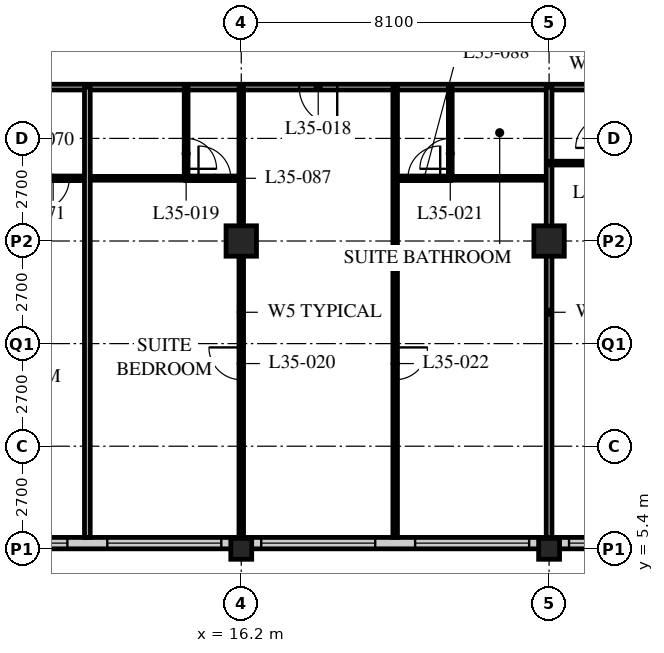
"""IFC4 building model, lengths in metres.
Left out: names, types, materials, properties, quantities, classifications, styles, units other than length and angle.
Written with IfcOpenShell. Run it as: python <this file> out.ifc"""

import sys

from ifc_helpers import new_model, si_unit, direction, frame, frame_2d, origin, origin_2d, place, context, subcontext, project, spatial, rectangle, hollow_rectangle, extrude, element, fill, save


model = new_model("IFC4")
c1 = context("Model", 3, precision=1e-05, world=origin(), true_north=direction((0.0, 1.0)))
c2 = subcontext(c1, "Body", "Model", "MODEL_VIEW")
j1 = project(units=[si_unit("LENGTHUNIT", "METRE"), si_unit("PLANEANGLEUNIT", "RADIAN")], contexts=[c1])
p1 = place(None, origin())
s1 = spatial("IfcSite", under=j1, at=p1, CompositionType="ELEMENT")
p2 = place(p1, origin())
s2 = spatial("IfcBuilding", under=s1, at=p2, CompositionType="ELEMENT")
p3 = place(p2, frame((0.0, 0.0, 137.4)))
s3 = spatial("IfcBuildingStorey", under=s2, at=p3, CompositionType="ELEMENT", Elevation=137.4)
p4 = place(p3, frame((16.2, 5.4, 0.0), z_axis=(0.0, 0.0, 1.0), x_axis=(1.0, 0.0, 0.0)))
e1 = element("IfcColumn", 1, at=p4, inside=s3, PredefinedType="COLUMN", context=c2, shape_type="SweptSolid", body=[
    extrude(hollow_rectangle(XDim=0.55, YDim=0.55, WallThickness=0.04, at=origin_2d()), origin(), (0.0, 0.0, 1.0), 3.4),
])
p5 = place(p3, frame((16.2, 13.5, 0.0), z_axis=(0.0, 0.0, 1.0), x_axis=(1.0, 0.0, 0.0)))
e2 = element("IfcColumn", 2, at=p5, inside=s3, PredefinedType="COLUMN", context=c2, shape_type="SweptSolid", body=[
    extrude(hollow_rectangle(XDim=0.8, YDim=0.8, WallThickness=0.08, at=origin_2d()), origin(), (0.0, 0.0, 1.0), 3.4),
])
p6 = place(p3, frame((24.3, 5.4, 0.0), z_axis=(0.0, 0.0, 1.0), x_axis=(1.0, 0.0, 0.0)))
e3 = element("IfcColumn", 3, at=p6, inside=s3, PredefinedType="COLUMN", context=c2, shape_type="SweptSolid", body=[
    extrude(hollow_rectangle(XDim=0.55, YDim=0.55, WallThickness=0.04, at=origin_2d()), origin(), (0.0, 0.0, 1.0), 3.4),
])
p7 = place(p3, frame((24.3, 13.5, 0.0), z_axis=(0.0, 0.0, 1.0), x_axis=(1.0, 0.0, 0.0)))
e4 = element("IfcColumn", 4, at=p7, inside=s3, PredefinedType="COLUMN", context=c2, shape_type="SweptSolid", body=[
    extrude(hollow_rectangle(XDim=0.8, YDim=0.8, WallThickness=0.08, at=origin_2d()), origin(), (0.0, 0.0, 1.0), 3.4),
])
p8 = place(p3, frame((8.4, 5.55, 0.0), z_axis=(0.0, 0.0, 1.0), x_axis=(1.0, 0.0, 0.0)))
e5 = element("IfcWall", 5, at=p8, inside=s3, PredefinedType="SOLIDWALL", context=c2, shape_type="SweptSolid", body=[
    extrude(rectangle(XDim=40.2, YDim=0.3, at=frame_2d((20.1, 0.0))), origin(), (0.0, 0.0, 1.0), 3.19),
])
p9 = place(p8, frame((0.225, 0.0, 0.9)))
e6 = element("IfcOpeningElement", 6, at=p9, cuts=e5, PredefinedType="OPENING", context=c2, shape_type="SweptSolid", body=[
    extrude(rectangle(XDim=3.0, YDim=2.0, at=frame_2d((1.5, 1.0))), frame((0.0, 0.16, 0.0), z_axis=(0.0, -1.0, 0.0), x_axis=(1.0, 0.0, 0.0)), (0.0, 0.0, 1.0), 0.32),
])
p10 = place(p8, frame((4.275, 0.0, 0.9)))
e7 = element("IfcOpeningElement", 7, at=p10, cuts=e5, PredefinedType="OPENING", context=c2, shape_type="SweptSolid", body=[
    extrude(rectangle(XDim=3.0, YDim=2.0, at=frame_2d((1.5, 1.0))), frame((0.0, 0.16, 0.0), z_axis=(0.0, -1.0, 0.0), x_axis=(1.0, 0.0, 0.0)), (0.0, 0.0, 1.0), 0.32),
])
p11 = place(p8, frame((8.325, 0.0, 0.9)))
e8 = element("IfcOpeningElement", 8, at=p11, cuts=e5, PredefinedType="OPENING", context=c2, shape_type="SweptSolid", body=[
    extrude(rectangle(XDim=3.0, YDim=2.0, at=frame_2d((1.5, 1.0))), frame((0.0, 0.16, 0.0), z_axis=(0.0, -1.0, 0.0), x_axis=(1.0, 0.0, 0.0)), (0.0, 0.0, 1.0), 0.32),
])
p12 = place(p8, frame((12.375, 0.0, 0.9)))
e9 = element("IfcOpeningElement", 9, at=p12, cuts=e5, PredefinedType="OPENING", context=c2, shape_type="SweptSolid", body=[
    extrude(rectangle(XDim=3.0, YDim=2.0, at=frame_2d((1.5, 1.0))), frame((0.0, 0.16, 0.0), z_axis=(0.0, -1.0, 0.0), x_axis=(1.0, 0.0, 0.0)), (0.0, 0.0, 1.0), 0.32),
])
p13 = place(p8, frame((16.425, 0.0, 0.9)))
e10 = element("IfcOpeningElement", 10, at=p13, cuts=e5, PredefinedType="OPENING", context=c2, shape_type="SweptSolid", body=[
    extrude(rectangle(XDim=3.0, YDim=2.0, at=frame_2d((1.5, 1.0))), frame((0.0, 0.16, 0.0), z_axis=(0.0, -1.0, 0.0), x_axis=(1.0, 0.0, 0.0)), (0.0, 0.0, 1.0), 0.32),
])
p14 = place(p8, frame((20.475, 0.0, 0.9)))
e11 = element("IfcOpeningElement", 11, at=p14, cuts=e5, PredefinedType="OPENING", context=c2, shape_type="SweptSolid", body=[
    extrude(rectangle(XDim=3.0, YDim=2.0, at=frame_2d((1.5, 1.0))), frame((0.0, 0.16, 0.0), z_axis=(0.0, -1.0, 0.0), x_axis=(1.0, 0.0, 0.0)), (0.0, 0.0, 1.0), 0.32),
])
p15 = place(p8, frame((24.525, 0.0, 0.9)))
e12 = element("IfcOpeningElement", 12, at=p15, cuts=e5, PredefinedType="OPENING", context=c2, shape_type="SweptSolid", body=[
    extrude(rectangle(XDim=3.0, YDim=2.0, at=frame_2d((1.5, 1.0))), frame((0.0, 0.16, 0.0), z_axis=(0.0, -1.0, 0.0), x_axis=(1.0, 0.0, 0.0)), (0.0, 0.0, 1.0), 0.32),
])
p16 = place(p8, frame((28.575, 0.0, 0.9)))
e13 = element("IfcOpeningElement", 13, at=p16, cuts=e5, PredefinedType="OPENING", context=c2, shape_type="SweptSolid", body=[
    extrude(rectangle(XDim=3.0, YDim=2.0, at=frame_2d((1.5, 1.0))), frame((0.0, 0.16, 0.0), z_axis=(0.0, -1.0, 0.0), x_axis=(1.0, 0.0, 0.0)), (0.0, 0.0, 1.0), 0.32),
])
p17 = place(p8, frame((32.625, 0.0, 0.9)))
e14 = element("IfcOpeningElement", 14, at=p17, cuts=e5, PredefinedType="OPENING", context=c2, shape_type="SweptSolid", body=[
    extrude(rectangle(XDim=3.0, YDim=2.0, at=frame_2d((1.5, 1.0))), frame((0.0, 0.16, 0.0), z_axis=(0.0, -1.0, 0.0), x_axis=(1.0, 0.0, 0.0)), (0.0, 0.0, 1.0), 0.32),
])
p18 = place(p8, frame((36.675, 0.0, 0.9)))
e15 = element("IfcOpeningElement", 15, at=p18, cuts=e5, PredefinedType="OPENING", context=c2, shape_type="SweptSolid", body=[
    extrude(rectangle(XDim=3.0, YDim=2.0, at=frame_2d((1.5, 1.0))), frame((0.0, 0.16, 0.0), z_axis=(0.0, -1.0, 0.0), x_axis=(1.0, 0.0, 0.0)), (0.0, 0.0, 1.0), 0.32),
])
p19 = place(p3, frame((8.1, 17.55, 0.0), z_axis=(0.0, 0.0, 1.0), x_axis=(1.0, 0.0, 0.0)))
e16 = element("IfcWall", 16, at=p19, inside=s3, PredefinedType="PARTITIONING", context=c2, shape_type="SweptSolid", body=[
    extrude(rectangle(XDim=36.45, YDim=0.15, at=frame_2d((18.225, 0.0))), origin(), (0.0, 0.0, 1.0), 3.19),
])
p20 = place(p19, frame((9.625, 0.0, 0.0)))
e17 = element("IfcOpeningElement", 17, at=p20, cuts=e16, PredefinedType="OPENING", context=c2, shape_type="SweptSolid", body=[
    extrude(rectangle(XDim=1.0, YDim=2.1, at=frame_2d((0.5, 1.05))), frame((0.0, 0.085, 0.0), z_axis=(0.0, -1.0, 0.0), x_axis=(1.0, 0.0, 0.0)), (0.0, 0.0, 1.0), 0.17),
])
p21 = place(p19, frame((18.1, 0.0, 0.0)))
e18 = element("IfcOpeningElement", 18, at=p21, cuts=e16, PredefinedType="OPENING", context=c2, shape_type="SweptSolid", body=[
    extrude(rectangle(XDim=1.0, YDim=2.1, at=frame_2d((0.5, 1.05))), frame((0.0, 0.085, 0.0), z_axis=(0.0, -1.0, 0.0), x_axis=(1.0, 0.0, 0.0)), (0.0, 0.0, 1.0), 0.17),
])
p22 = place(p19, frame((26.75, 0.0, 0.0)))
e19 = element("IfcOpeningElement", 19, at=p22, cuts=e16, PredefinedType="OPENING", context=c2, shape_type="SweptSolid", body=[
    extrude(rectangle(XDim=1.0, YDim=2.1, at=frame_2d((0.5, 1.05))), frame((0.0, 0.085, 0.0), z_axis=(0.0, -1.0, 0.0), x_axis=(1.0, 0.0, 0.0)), (0.0, 0.0, 1.0), 0.17),
])
p23 = place(p19, frame((30.8, 0.0, 0.0)))
e20 = element("IfcOpeningElement", 20, at=p23, cuts=e16, PredefinedType="OPENING", context=c2, shape_type="SweptSolid", body=[
    extrude(rectangle(XDim=1.0, YDim=2.1, at=frame_2d((0.5, 1.05))), frame((0.0, 0.085, 0.0), z_axis=(0.0, -1.0, 0.0), x_axis=(1.0, 0.0, 0.0)), (0.0, 0.0, 1.0), 0.17),
])
p24 = place(p19, frame((1.525, 0.0, 0.0)))
e21 = element("IfcOpeningElement", 21, at=p24, cuts=e16, PredefinedType="OPENING", context=c2, shape_type="SweptSolid", body=[
    extrude(rectangle(XDim=1.0, YDim=2.1, at=frame_2d((0.5, 1.05))), frame((0.0, 0.085, 0.0), z_axis=(0.0, -1.0, 0.0), x_axis=(1.0, 0.0, 0.0)), (0.0, 0.0, 1.0), 0.17),
])
p25 = place(p19, frame((33.925, 0.0, 0.0)))
e22 = element("IfcOpeningElement", 22, at=p25, cuts=e16, PredefinedType="OPENING", context=c2, shape_type="SweptSolid", body=[
    extrude(rectangle(XDim=1.0, YDim=2.1, at=frame_2d((0.5, 1.05))), frame((0.0, 0.085, 0.0), z_axis=(0.0, -1.0, 0.0), x_axis=(1.0, 0.0, 0.0)), (0.0, 0.0, 1.0), 0.17),
])
p26 = place(p3, frame((12.15, 15.15, 0.0), z_axis=(0.0, 0.0, 1.0), x_axis=(1.0, 0.0, 0.0)))
e23 = element("IfcWall", 23, at=p26, inside=s3, PredefinedType="PARTITIONING", context=c2, shape_type="SweptSolid", body=[
    extrude(rectangle(XDim=2.6, YDim=0.1, at=frame_2d((1.3, 0.0))), origin(), (0.0, 0.0, 1.0), 3.19),
])
p27 = place(p3, frame((14.75, 17.55, 0.0), z_axis=(0.0, 0.0, 1.0), x_axis=(0.0, -1.0, 0.0)))
e24 = element("IfcWall", 24, at=p27, inside=s3, PredefinedType="PARTITIONING", context=c2, shape_type="SweptSolid", body=[
    extrude(rectangle(XDim=2.4, YDim=0.1, at=frame_2d((1.2, 0.0))), origin(), (0.0, 0.0, 1.0), 3.19),
])
p28 = place(p27, frame((1.35, 0.0, 0.0)))
e25 = element("IfcOpeningElement", 25, at=p28, cuts=e24, PredefinedType="OPENING", context=c2, shape_type="SweptSolid", body=[
    extrude(rectangle(XDim=0.8, YDim=2.1, at=frame_2d((0.4, 1.05))), frame((0.0, 0.06, 0.0), z_axis=(0.0, -1.0, 0.0), x_axis=(1.0, 0.0, 0.0)), (0.0, 0.0, 1.0), 0.12),
])
p29 = place(p3, frame((16.2, 17.55, 0.0), z_axis=(0.0, 0.0, 1.0), x_axis=(0.0, -1.0, 0.0)))
e26 = element("IfcWall", 26, at=p29, inside=s3, PredefinedType="PARTITIONING", context=c2, shape_type="SweptSolid", body=[
    extrude(rectangle(XDim=11.85, YDim=0.12, at=frame_2d((5.925, 0.0))), origin(), (0.0, 0.0, 1.0), 2.578),
])
p30 = place(p29, frame((6.85, 0.0, 0.0)))
e27 = element("IfcOpeningElement", 27, at=p30, cuts=e26, PredefinedType="OPENING", context=c2, shape_type="SweptSolid", body=[
    extrude(rectangle(XDim=0.85, YDim=2.1, at=frame_2d((0.425, 1.05))), frame((0.0, 0.07, 0.0), z_axis=(0.0, -1.0, 0.0), x_axis=(1.0, 0.0, 0.0)), (0.0, 0.0, 1.0), 0.14),
])
p31 = place(p3, frame((21.7, 15.15, 0.0), z_axis=(0.0, 0.0, 1.0), x_axis=(1.0, 0.0, 0.0)))
e28 = element("IfcWall", 28, at=p31, inside=s3, PredefinedType="PARTITIONING", context=c2, shape_type="SweptSolid", body=[
    extrude(rectangle(XDim=2.6, YDim=0.1, at=frame_2d((1.3, 0.0))), origin(), (0.0, 0.0, 1.0), 3.19),
])
p32 = place(p3, frame((21.7, 17.55, 0.0), z_axis=(0.0, 0.0, 1.0), x_axis=(0.0, -1.0, 0.0)))
e29 = element("IfcWall", 29, at=p32, inside=s3, PredefinedType="PARTITIONING", context=c2, shape_type="SweptSolid", body=[
    extrude(rectangle(XDim=2.4, YDim=0.1, at=frame_2d((1.2, 0.0))), origin(), (0.0, 0.0, 1.0), 3.19),
])
p33 = place(p32, frame((1.35, 0.0, 0.0)))
e30 = element("IfcOpeningElement", 30, at=p33, cuts=e29, PredefinedType="OPENING", context=c2, shape_type="SweptSolid", body=[
    extrude(rectangle(XDim=0.8, YDim=2.1, at=frame_2d((0.4, 1.05))), frame((0.0, 0.06, 0.0), z_axis=(0.0, -1.0, 0.0), x_axis=(1.0, 0.0, 0.0)), (0.0, 0.0, 1.0), 0.12),
])
p34 = place(p3, frame((20.25, 17.55, 0.0), z_axis=(0.0, 0.0, 1.0), x_axis=(0.0, -1.0, 0.0)))
e31 = element("IfcWall", 31, at=p34, inside=s3, PredefinedType="PARTITIONING", context=c2, shape_type="SweptSolid", body=[
    extrude(rectangle(XDim=11.85, YDim=0.12, at=frame_2d((5.925, 0.0))), origin(), (0.0, 0.0, 1.0), 3.19),
])
p35 = place(p34, frame((6.85, 0.0, 0.0)))
e32 = element("IfcOpeningElement", 32, at=p35, cuts=e31, PredefinedType="OPENING", context=c2, shape_type="SweptSolid", body=[
    extrude(rectangle(XDim=0.85, YDim=2.1, at=frame_2d((0.425, 1.05))), frame((0.0, 0.07, 0.0), z_axis=(0.0, -1.0, 0.0), x_axis=(1.0, 0.0, 0.0)), (0.0, 0.0, 1.0), 0.14),
])
p36 = place(p3, frame((24.3, 17.55, 0.0), z_axis=(0.0, 0.0, 1.0), x_axis=(0.0, -1.0, 0.0)))
e33 = element("IfcWall", 33, at=p36, inside=s3, PredefinedType="PARTITIONING", context=c2, shape_type="SweptSolid", body=[
    extrude(rectangle(XDim=11.85, YDim=0.15, at=frame_2d((5.925, 0.0))), origin(), (0.0, 0.0, 1.0), 2.578),
])
p37 = place(p3, frame((24.3, 15.55, 0.0), z_axis=(0.0, 0.0, 1.0), x_axis=(1.0, 0.0, 0.0)))
e34 = element("IfcWall", 34, at=p37, inside=s3, PredefinedType="PARTITIONING", context=c2, shape_type="SweptSolid", body=[
    extrude(rectangle(XDim=1.5, YDim=0.1, at=frame_2d((0.75, 0.0))), origin(), (0.0, 0.0, 1.0), 3.19),
])
p38 = place(p3, frame((4.1, 15.15, 0.0), z_axis=(0.0, 0.0, 1.0), x_axis=(1.0, 0.0, 0.0)))
e35 = element("IfcWall", 35, at=p38, inside=s3, PredefinedType="PARTITIONING", context=c2, shape_type="SweptSolid", body=[
    extrude(rectangle(XDim=8.05, YDim=0.12, at=frame_2d((4.025, 0.0))), origin(), (0.0, 0.0, 1.0), 3.19),
])
p39 = place(p38, frame((6.725, 0.0, 0.0)))
e36 = element("IfcOpeningElement", 36, at=p39, cuts=e35, PredefinedType="OPENING", context=c2, shape_type="SweptSolid", body=[
    extrude(rectangle(XDim=0.85, YDim=2.1, at=frame_2d((0.425, 1.05))), frame((0.0, 0.07, 0.0), z_axis=(0.0, -1.0, 0.0), x_axis=(1.0, 0.0, 0.0)), (0.0, 0.0, 1.0), 0.14),
])
p40 = place(p38, frame((2.875, 0.0, 0.0)))
e37 = element("IfcOpeningElement", 37, at=p40, cuts=e35, PredefinedType="OPENING", context=c2, shape_type="SweptSolid", body=[
    extrude(rectangle(XDim=0.85, YDim=2.1, at=frame_2d((0.425, 1.05))), frame((0.0, 0.07, 0.0), z_axis=(0.0, -1.0, 0.0), x_axis=(1.0, 0.0, 0.0)), (0.0, 0.0, 1.0), 0.14),
])
p41 = place(p3, frame((12.15, 17.55, 0.0), z_axis=(0.0, 0.0, 1.0), x_axis=(0.0, -1.0, 0.0)))
e38 = element("IfcWall", 38, at=p41, inside=s3, PredefinedType="PARTITIONING", context=c2, shape_type="SweptSolid", body=[
    extrude(rectangle(XDim=11.85, YDim=0.15, at=frame_2d((5.925, 0.0))), origin(), (0.0, 0.0, 1.0), 3.19),
])
p42 = place(p3, frame((16.2, 15.15, 0.0), z_axis=(0.0, 0.0, 1.0), x_axis=(-1.0, 0.0, 0.0)))
e39 = element("IfcWall", 39, at=p42, inside=s3, PredefinedType="PARTITIONING", context=c2, shape_type="SweptSolid", body=[
    extrude(rectangle(XDim=1.46, YDim=0.12, at=frame_2d((0.73, 0.0))), origin(), (0.0, 0.0, 1.0), 3.19),
])
p43 = place(p42, frame((0.275, 0.0, 0.0)))
e40 = element("IfcOpeningElement", 40, at=p43, cuts=e39, PredefinedType="OPENING", context=c2, shape_type="SweptSolid", body=[
    extrude(rectangle(XDim=0.85, YDim=2.1, at=frame_2d((0.425, 1.05))), frame((0.0, 0.07, 0.0), z_axis=(0.0, -1.0, 0.0), x_axis=(1.0, 0.0, 0.0)), (0.0, 0.0, 1.0), 0.14),
])
p44 = place(p3, frame((21.71, 15.15, 0.0), z_axis=(0.0, 0.0, 1.0), x_axis=(-1.0, 0.0, 0.0)))
e41 = element("IfcWall", 41, at=p44, inside=s3, PredefinedType="PARTITIONING", context=c2, shape_type="SweptSolid", body=[
    extrude(rectangle(XDim=1.46, YDim=0.12, at=frame_2d((0.73, 0.0))), origin(), (0.0, 0.0, 1.0), 3.19),
])
p45 = place(p44, frame((0.275, 0.0, 0.0)))
e42 = element("IfcOpeningElement", 42, at=p45, cuts=e41, PredefinedType="OPENING", context=c2, shape_type="SweptSolid", body=[
    extrude(rectangle(XDim=0.85, YDim=2.1, at=frame_2d((0.425, 1.05))), frame((0.0, 0.07, 0.0), z_axis=(0.0, -1.0, 0.0), x_axis=(1.0, 0.0, 0.0)), (0.0, 0.0, 1.0), 0.14),
])
p46 = place(p9, origin())
e43 = element("IfcWindow", 43, at=p46, inside=s3, PartitioningType="SINGLE_PANEL", PredefinedType="WINDOW", context=c2, shape_type="SweptSolid", body=[
    extrude(rectangle(XDim=3.0, YDim=2.0, at=frame_2d((1.5, 1.0))), frame((0.0, 0.03, 0.0), z_axis=(0.0, -1.0, 0.0), x_axis=(1.0, 0.0, 0.0)), (0.0, 0.0, 1.0), 0.06),
])
fill(e6, e43)
p47 = place(p10, origin())
e44 = element("IfcWindow", 44, at=p47, inside=s3, PartitioningType="SINGLE_PANEL", PredefinedType="WINDOW", context=c2, shape_type="SweptSolid", body=[
    extrude(rectangle(XDim=3.0, YDim=2.0, at=frame_2d((1.5, 1.0))), frame((0.0, 0.03, 0.0), z_axis=(0.0, -1.0, 0.0), x_axis=(1.0, 0.0, 0.0)), (0.0, 0.0, 1.0), 0.06),
])
fill(e7, e44)
p48 = place(p11, origin())
e45 = element("IfcWindow", 45, at=p48, inside=s3, PartitioningType="SINGLE_PANEL", PredefinedType="WINDOW", context=c2, shape_type="SweptSolid", body=[
    extrude(rectangle(XDim=3.0, YDim=2.0, at=frame_2d((1.5, 1.0))), frame((0.0, 0.03, 0.0), z_axis=(0.0, -1.0, 0.0), x_axis=(1.0, 0.0, 0.0)), (0.0, 0.0, 1.0), 0.06),
])
fill(e8, e45)
p49 = place(p12, origin())
e46 = element("IfcWindow", 46, at=p49, inside=s3, PartitioningType="SINGLE_PANEL", PredefinedType="WINDOW", context=c2, shape_type="SweptSolid", body=[
    extrude(rectangle(XDim=3.0, YDim=2.0, at=frame_2d((1.5, 1.0))), frame((0.0, 0.03, 0.0), z_axis=(0.0, -1.0, 0.0), x_axis=(1.0, 0.0, 0.0)), (0.0, 0.0, 1.0), 0.06),
])
fill(e9, e46)
p50 = place(p13, origin())
e47 = element("IfcWindow", 47, at=p50, inside=s3, PartitioningType="SINGLE_PANEL", PredefinedType="WINDOW", context=c2, shape_type="SweptSolid", body=[
    extrude(rectangle(XDim=3.0, YDim=2.0, at=frame_2d((1.5, 1.0))), frame((0.0, 0.03, 0.0), z_axis=(0.0, -1.0, 0.0), x_axis=(1.0, 0.0, 0.0)), (0.0, 0.0, 1.0), 0.06),
])
fill(e10, e47)
p51 = place(p20, origin())
e48 = element("IfcDoor", 48, at=p51, inside=s3, OperationType="SINGLE_SWING_LEFT", PredefinedType="DOOR", context=c2, shape_type="SweptSolid", body=[
    extrude(rectangle(XDim=1.0, YDim=2.1, at=frame_2d((0.5, 1.05))), frame((0.0, 0.025, 0.0), z_axis=(0.0, -1.0, 0.0), x_axis=(1.0, 0.0, 0.0)), (0.0, 0.0, 1.0), 0.05),
])
fill(e17, e48)
p52 = place(p28, origin())
e49 = element("IfcDoor", 49, at=p52, inside=s3, OperationType="SINGLE_SWING_RIGHT", PredefinedType="DOOR", context=c2, shape_type="SweptSolid", body=[
    extrude(rectangle(XDim=0.8, YDim=2.1, at=frame_2d((0.4, 1.05))), frame((0.0, 0.025, 0.0), z_axis=(0.0, -1.0, 0.0), x_axis=(1.0, 0.0, 0.0)), (0.0, 0.0, 1.0), 0.05),
])
fill(e25, e49)
p53 = place(p30, origin())
e50 = element("IfcDoor", 50, at=p53, inside=s3, OperationType="SINGLE_SWING_RIGHT", PredefinedType="DOOR", context=c2, shape_type="SweptSolid", body=[
    extrude(rectangle(XDim=0.85, YDim=2.1, at=frame_2d((0.425, 1.05))), frame((0.0, 0.025, 0.0), z_axis=(0.0, -1.0, 0.0), x_axis=(1.0, 0.0, 0.0)), (0.0, 0.0, 1.0), 0.05),
])
fill(e27, e50)
p54 = place(p33, origin())
e51 = element("IfcDoor", 51, at=p54, inside=s3, OperationType="SINGLE_SWING_LEFT", PredefinedType="DOOR", context=c2, shape_type="SweptSolid", body=[
    extrude(rectangle(XDim=0.8, YDim=2.1, at=frame_2d((0.4, 1.05))), frame((0.0, 0.025, 0.0), z_axis=(0.0, -1.0, 0.0), x_axis=(1.0, 0.0, 0.0)), (0.0, 0.0, 1.0), 0.05),
])
fill(e30, e51)
p55 = place(p35, origin())
e52 = element("IfcDoor", 52, at=p55, inside=s3, OperationType="SINGLE_SWING_LEFT", PredefinedType="DOOR", context=c2, shape_type="SweptSolid", body=[
    extrude(rectangle(XDim=0.85, YDim=2.1, at=frame_2d((0.425, 1.05))), frame((0.0, 0.025, 0.0), z_axis=(0.0, -1.0, 0.0), x_axis=(1.0, 0.0, 0.0)), (0.0, 0.0, 1.0), 0.05),
])
fill(e32, e52)
p56 = place(p39, origin())
e53 = element("IfcDoor", 53, at=p56, inside=s3, OperationType="SINGLE_SWING_RIGHT", PredefinedType="DOOR", context=c2, shape_type="SweptSolid", body=[
    extrude(rectangle(XDim=0.85, YDim=2.1, at=frame_2d((0.425, 1.05))), frame((0.0, 0.025, 0.0), z_axis=(0.0, -1.0, 0.0), x_axis=(1.0, 0.0, 0.0)), (0.0, 0.0, 1.0), 0.05),
])
fill(e36, e53)
p57 = place(p43, origin())
e54 = element("IfcDoor", 54, at=p57, inside=s3, OperationType="SINGLE_SWING_LEFT", PredefinedType="DOOR", context=c2, shape_type="SweptSolid", body=[
    extrude(rectangle(XDim=0.85, YDim=2.1, at=frame_2d((0.425, 1.05))), frame((0.0, 0.025, 0.0), z_axis=(0.0, -1.0, 0.0), x_axis=(1.0, 0.0, 0.0)), (0.0, 0.0, 1.0), 0.05),
])
fill(e40, e54)
p58 = place(p45, origin())
e55 = element("IfcDoor", 55, at=p58, inside=s3, OperationType="SINGLE_SWING_RIGHT", PredefinedType="DOOR", context=c2, shape_type="SweptSolid", body=[
    extrude(rectangle(XDim=0.85, YDim=2.1, at=frame_2d((0.425, 1.05))), frame((0.0, 0.025, 0.0), z_axis=(0.0, -1.0, 0.0), x_axis=(1.0, 0.0, 0.0)), (0.0, 0.0, 1.0), 0.05),
])
fill(e42, e55)
save(model, sys.argv[1])
